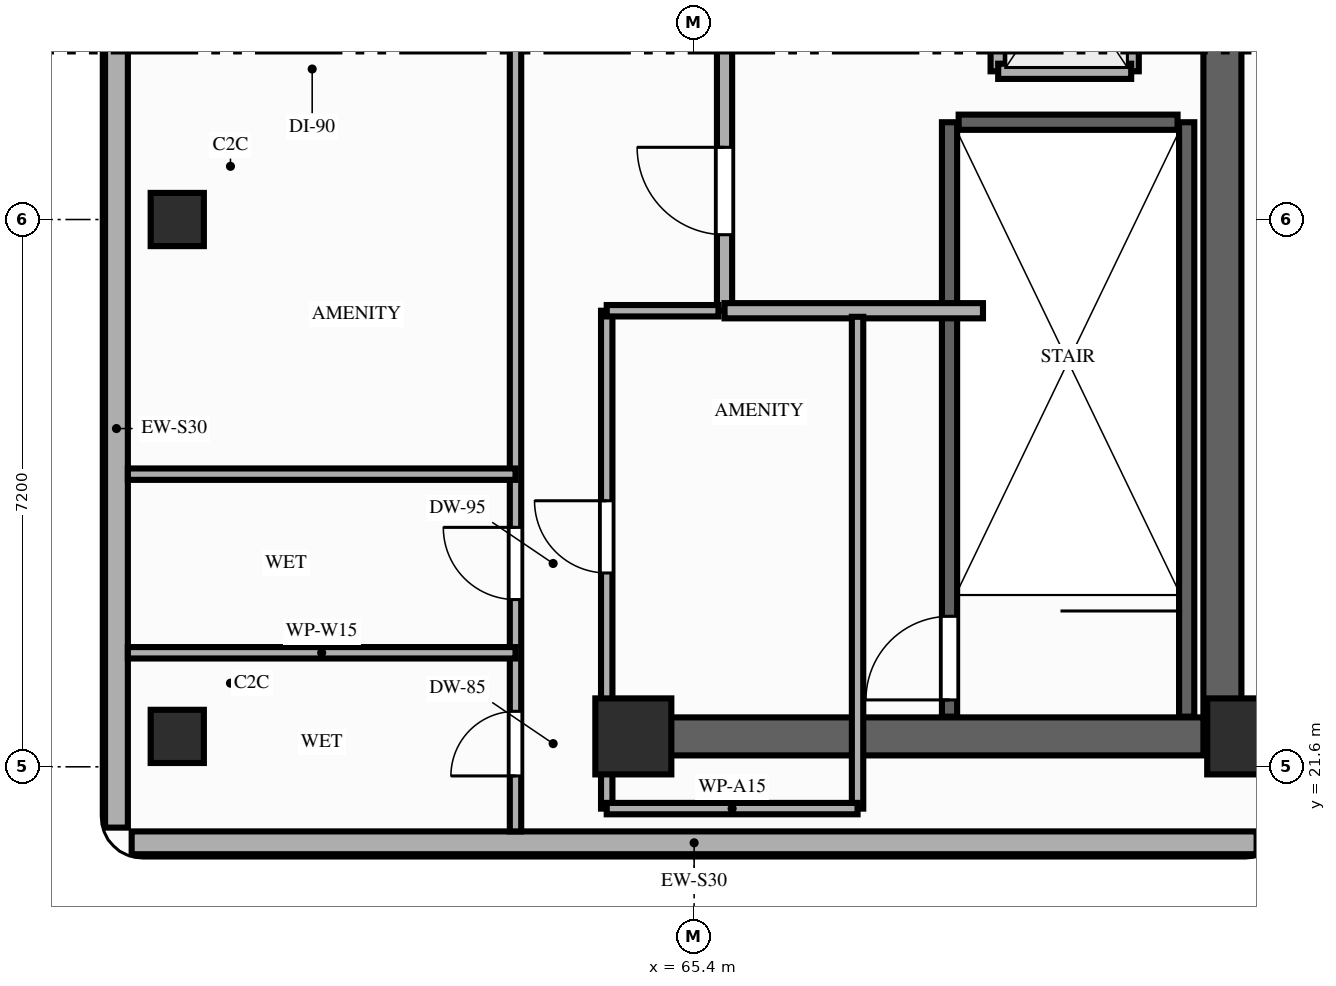
"""IFC4 building model, lengths in metres.
Left out: names, types, materials, properties, quantities, classifications, styles, units other than length and angle.
Written with IfcOpenShell. Run it as: python <this file> out.ifc"""

import sys

from ifc_helpers import new_model, si_unit, direction, frame, frame_2d, origin, origin_2d, place, context, subcontext, project, spatial, rectangle, extrude, element, fill, save


model = new_model("IFC4")
c1 = context("Model", 3, precision=1e-05, world=origin(), true_north=direction((0.0, 1.0)))
c2 = subcontext(c1, "Body", "Model", "MODEL_VIEW")
j1 = project(units=[si_unit("LENGTHUNIT", "METRE"), si_unit("PLANEANGLEUNIT", "RADIAN")], contexts=[c1])
p1 = place(None, origin())
s1 = spatial("IfcSite", under=j1, at=p1, CompositionType="ELEMENT")
p2 = place(p1, origin())
s2 = spatial("IfcBuilding", under=s1, at=p2, CompositionType="ELEMENT")
p3 = place(p2, frame((0.0, 0.0, 102.6)))
s3 = spatial("IfcBuildingStorey", under=s2, at=p3, CompositionType="ELEMENT", Elevation=102.6)
for number, where, z_axis, x_axis in (
    (1, (64.6, 22.0, 0.0), (0.0, 0.0, 1.0), (1.0, 0.0, 0.0)),
    (2, (72.65, 22.0, 0.0), (0.0, 0.0, 1.0), (1.0, 0.0, 0.0)),
):
    element("IfcColumn", number, at=place(p3, frame(where, z_axis=z_axis, x_axis=x_axis)), inside=s3, PredefinedType="COLUMN", context=c2, shape_type="SweptSolid", body=[
        extrude(rectangle(XDim=1.0, YDim=1.0, at=origin_2d()), origin(), (0.0, 0.0, 1.0), 4.8),
    ])
for number, where, z_axis, x_axis in (
    (3, (58.6, 22.0, 0.0), (0.0, 0.0, 1.0), (1.0, 0.0, 0.0)),
    (4, (58.6, 28.8, 0.0), (0.0, 0.0, 1.0), (1.0, 0.0, 0.0)),
):
    element("IfcColumn", number, at=place(p3, frame(where, z_axis=z_axis, x_axis=x_axis)), inside=s3, PredefinedType="COLUMN", context=c2, shape_type="SweptSolid", body=[
        extrude(rectangle(XDim=0.7, YDim=0.7, at=origin_2d()), origin(), (0.0, 0.0, 1.0), 4.8),
    ])
p4 = place(p3, frame((57.8, 31.3, 0.0), z_axis=(0.0, 0.0, 1.0), x_axis=(0.0, -1.0, 0.0)))
e5 = element("IfcWall", 5, at=p4, inside=s3, PredefinedType="STANDARD", context=c2, shape_type="SweptSolid", body=[
    extrude(rectangle(XDim=10.5, YDim=0.3, at=frame_2d((5.25, 0.0))), origin(), (0.0, 0.0, 1.0), 4.58),
])
p5 = place(p3, frame((58.0, 20.6, 0.0), z_axis=(0.0, 0.0, 1.0), x_axis=(1.0, 0.0, 0.0)))
e6 = element("IfcWall", 6, at=p5, inside=s3, PredefinedType="STANDARD", context=c2, shape_type="SweptSolid", body=[
    extrude(rectangle(XDim=14.8, YDim=0.3, at=frame_2d((7.4, 0.0))), origin(), (0.0, 0.0, 1.0), 4.58),
])
p6 = place(p3, frame((72.35, 22.0, 0.0), z_axis=(0.0, 0.0, 1.0), x_axis=(0.0, 1.0, 0.0)))
e7 = element("IfcWall", 7, at=p6, inside=s3, PredefinedType="SHEAR", context=c2, shape_type="SweptSolid", body=[
    extrude(rectangle(XDim=20.25, YDim=0.5, at=frame_2d((10.125, 0.0))), origin(), (0.0, 0.0, 1.0), 4.56),
])
p7 = place(p3, frame((64.6, 22.0, 0.0), z_axis=(0.0, 0.0, 1.0), x_axis=(1.0, 0.0, 0.0)))
e8 = element("IfcWall", 8, at=p7, inside=s3, PredefinedType="SHEAR", context=c2, shape_type="SweptSolid", body=[
    extrude(rectangle(XDim=7.5, YDim=0.5, at=frame_2d((3.75, 0.0))), origin(), (0.0, 0.0, 1.0), 4.56),
])
p8 = place(p3, frame((68.76, 22.26, 0.0), z_axis=(0.0, 0.0, 1.0), x_axis=(0.0, 1.0, 0.0)))
e9 = element("IfcWall", 9, at=p8, inside=s3, PredefinedType="SHEAR", context=c2, shape_type="SweptSolid", body=[
    extrude(rectangle(XDim=7.82, YDim=0.2, at=frame_2d((3.91, 0.0))), origin(), (0.0, 0.0, 1.0), 4.56),
])
p9 = place(p8, frame((0.22, 0.0, 0.0)))
e10 = element("IfcOpeningElement", 10, at=p9, cuts=e9, PredefinedType="OPENING", context=c2, shape_type="SweptSolid", body=[
    extrude(rectangle(XDim=1.1, YDim=2.15, at=frame_2d((0.55, 1.075))), frame((0.0, 0.11, 0.0), z_axis=(0.0, -1.0, 0.0), x_axis=(1.0, 0.0, 0.0)), (0.0, 0.0, 1.0), 0.22),
])
p10 = place(p3, frame((71.88, 22.26, 0.0), z_axis=(0.0, 0.0, 1.0), x_axis=(0.0, 1.0, 0.0)))
e11 = element("IfcWall", 11, at=p10, inside=s3, PredefinedType="SHEAR", context=c2, shape_type="SweptSolid", body=[
    extrude(rectangle(XDim=7.82, YDim=0.2, at=frame_2d((3.91, 0.0))), origin(), (0.0, 0.0, 1.0), 4.56),
])
p11 = place(p3, frame((68.88, 30.08, 0.0), z_axis=(0.0, 0.0, 1.0), x_axis=(1.0, 0.0, 0.0)))
e12 = element("IfcWall", 12, at=p11, inside=s3, PredefinedType="SHEAR", context=c2, shape_type="SweptSolid", body=[
    extrude(rectangle(XDim=2.88, YDim=0.2, at=frame_2d((1.44, 0.0))), origin(), (0.0, 0.0, 1.0), 4.56),
])
p12 = place(p3, frame((69.4, 30.75, 0.0), z_axis=(0.0, 0.0, 1.0), x_axis=(0.0, 1.0, 0.0)))
e13 = element("IfcWall", 13, at=p12, inside=s3, PredefinedType="MOVABLE", context=c2, shape_type="SweptSolid", body=[
    extrude(rectangle(XDim=2.45, YDim=0.2, at=frame_2d((1.225, 0.0))), origin(), (0.0, 0.0, 1.0), 4.56),
])
p13 = place(p12, frame((0.65, 0.0, 0.0)))
e14 = element("IfcOpeningElement", 14, at=p13, cuts=e13, PredefinedType="OPENING", context=c2, shape_type="SweptSolid", body=[
    extrude(rectangle(XDim=1.05, YDim=2.15, at=frame_2d((0.525, 1.075))), frame((0.0, 0.11, 0.0), z_axis=(0.0, -1.0, 0.0), x_axis=(1.0, 0.0, 0.0)), (0.0, 0.0, 1.0), 0.22),
])
p14 = place(p3, frame((71.15, 30.75, 0.0), z_axis=(0.0, 0.0, 1.0), x_axis=(0.0, 1.0, 0.0)))
e15 = element("IfcWall", 15, at=p14, inside=s3, PredefinedType="MOVABLE", context=c2, shape_type="SweptSolid", body=[
    extrude(rectangle(XDim=2.45, YDim=0.2, at=frame_2d((1.225, 0.0))), origin(), (0.0, 0.0, 1.0), 4.56),
])
p15 = place(p3, frame((69.4, 30.75, 0.0), z_axis=(0.0, 0.0, 1.0), x_axis=(1.0, 0.0, 0.0)))
e16 = element("IfcWall", 16, at=p15, inside=s3, PredefinedType="MOVABLE", context=c2, shape_type="SweptSolid", body=[
    extrude(rectangle(XDim=1.75, YDim=0.2, at=frame_2d((0.875, 0.0))), origin(), (0.0, 0.0, 1.0), 4.56),
])
p16 = place(p3, frame((65.8, 27.6, 0.0), z_axis=(0.0, 0.0, 1.0), x_axis=(0.0, 1.0, 0.0)))
e17 = element("IfcWall", 17, at=p16, inside=s3, PredefinedType="PARTITIONING", context=c2, shape_type="SweptSolid", body=[
    extrude(rectangle(XDim=5.5, YDim=0.2, at=frame_2d((2.75, 0.0))), origin(), (0.0, 0.0, 1.0), 4.56),
])
p17 = place(p16, frame((1.0, 0.0, 0.0)))
e18 = element("IfcOpeningElement", 18, at=p17, cuts=e17, PredefinedType="OPENING", context=c2, shape_type="SweptSolid", body=[
    extrude(rectangle(XDim=1.15, YDim=2.15, at=frame_2d((0.575, 1.075))), frame((0.0, 0.11, 0.0), z_axis=(0.0, -1.0, 0.0), x_axis=(1.0, 0.0, 0.0)), (0.0, 0.0, 1.0), 0.22),
])
p18 = place(p3, frame((65.8, 27.6, 0.0), z_axis=(0.0, 0.0, 1.0), x_axis=(1.0, 0.0, 0.0)))
e19 = element("IfcWall", 19, at=p18, inside=s3, PredefinedType="PARTITIONING", context=c2, shape_type="SweptSolid", body=[
    extrude(rectangle(XDim=3.4, YDim=0.2, at=frame_2d((1.7, 0.0))), origin(), (0.0, 0.0, 1.0), 4.56),
])
p19 = place(p3, frame((64.25, 21.05, 0.0), z_axis=(0.0, 0.0, 1.0), x_axis=(0.0, 1.0, 0.0)))
e20 = element("IfcWall", 20, at=p19, inside=s3, PredefinedType="PARTITIONING", context=c2, shape_type="SweptSolid", body=[
    extrude(rectangle(XDim=6.55, YDim=0.15, at=frame_2d((3.275, 0.0))), origin(), (0.0, 0.0, 1.0), 4.17),
])
p20 = place(p19, frame((3.1, 0.0, 0.0)))
e21 = element("IfcOpeningElement", 21, at=p20, cuts=e20, PredefinedType="OPENING", context=c2, shape_type="SweptSolid", body=[
    extrude(rectangle(XDim=0.95, YDim=2.15, at=frame_2d((0.475, 1.075))), frame((0.0, 0.085, 0.0), z_axis=(0.0, -1.0, 0.0), x_axis=(1.0, 0.0, 0.0)), (0.0, 0.0, 1.0), 0.17),
])
p21 = place(p3, frame((67.55, 21.05, 0.0), z_axis=(0.0, 0.0, 1.0), x_axis=(0.0, 1.0, 0.0)))
e22 = element("IfcWall", 22, at=p21, inside=s3, PredefinedType="PARTITIONING", context=c2, shape_type="SweptSolid", body=[
    extrude(rectangle(XDim=6.47, YDim=0.15, at=frame_2d((3.235, 0.0))), origin(), (0.0, 0.0, 1.0), 4.17),
])
p22 = place(p3, frame((64.25, 21.05, 0.0), z_axis=(0.0, 0.0, 1.0), x_axis=(1.0, 0.0, 0.0)))
e23 = element("IfcWall", 23, at=p22, inside=s3, PredefinedType="PARTITIONING", context=c2, shape_type="SweptSolid", body=[
    extrude(rectangle(XDim=3.3, YDim=0.15, at=frame_2d((1.65, 0.0))), origin(), (0.0, 0.0, 1.0), 4.56),
])
p23 = place(p3, frame((64.25, 27.6, 0.0), z_axis=(0.0, 0.0, 1.0), x_axis=(1.0, 0.0, 0.0)))
e24 = element("IfcWall", 24, at=p23, inside=s3, PredefinedType="PARTITIONING", context=c2, shape_type="SweptSolid", body=[
    extrude(rectangle(XDim=1.47, YDim=0.15, at=frame_2d((0.735, 0.0))), origin(), (0.0, 0.0, 1.0), 4.17),
])
p24 = place(p3, frame((63.05, 20.75, 0.0), z_axis=(0.0, 0.0, 1.0), x_axis=(0.0, 1.0, 0.0)))
e25 = element("IfcWall", 25, at=p24, inside=s3, PredefinedType="PARTITIONING", context=c2, shape_type="SweptSolid", body=[
    extrude(rectangle(XDim=10.55, YDim=0.15, at=frame_2d((5.275, 0.0))), origin(), (0.0, 0.0, 1.0), 4.17),
])
p25 = place(p24, frame((0.73, 0.0, 0.0)))
e26 = element("IfcOpeningElement", 26, at=p25, cuts=e25, PredefinedType="OPENING", context=c2, shape_type="SweptSolid", body=[
    extrude(rectangle(XDim=0.85, YDim=2.1, at=frame_2d((0.425, 1.05))), frame((0.0, 0.085, 0.0), z_axis=(0.0, -1.0, 0.0), x_axis=(1.0, 0.0, 0.0)), (0.0, 0.0, 1.0), 0.17),
])
p26 = place(p24, frame((3.05, 0.0, 0.0)))
e27 = element("IfcOpeningElement", 27, at=p26, cuts=e25, PredefinedType="OPENING", context=c2, shape_type="SweptSolid", body=[
    extrude(rectangle(XDim=0.95, YDim=2.1, at=frame_2d((0.475, 1.05))), frame((0.0, 0.085, 0.0), z_axis=(0.0, -1.0, 0.0), x_axis=(1.0, 0.0, 0.0)), (0.0, 0.0, 1.0), 0.17),
])
for number, where, z_axis, x_axis in (
    (28, (57.95, 23.1, 0.0), (0.0, 0.0, 1.0), (1.0, 0.0, 0.0)),
    (29, (57.95, 25.45, 0.0), (0.0, 0.0, 1.0), (1.0, 0.0, 0.0)),
):
    element("IfcWall", number, at=place(p3, frame(where, z_axis=z_axis, x_axis=x_axis)), inside=s3, PredefinedType="PARTITIONING", context=c2, shape_type="SweptSolid", body=[
        extrude(rectangle(XDim=5.1, YDim=0.15, at=frame_2d((2.55, 0.0))), origin(), (0.0, 0.0, 1.0), 4.17),
    ])
p27 = place(p9, origin())
e30 = element("IfcDoor", 30, at=p27, inside=s3, OperationType="SINGLE_SWING_LEFT", PredefinedType="DOOR", context=c2, shape_type="SweptSolid", body=[
    extrude(rectangle(XDim=1.1, YDim=2.15, at=frame_2d((0.55, 1.075))), frame((0.0, 0.025, 0.0), z_axis=(0.0, -1.0, 0.0), x_axis=(1.0, 0.0, 0.0)), (0.0, 0.0, 1.0), 0.05),
])
fill(e10, e30)
p28 = place(p17, origin())
e31 = element("IfcDoor", 31, at=p28, inside=s3, OperationType="SINGLE_SWING_RIGHT", PredefinedType="DOOR", context=c2, shape_type="SweptSolid", body=[
    extrude(rectangle(XDim=1.15, YDim=2.15, at=frame_2d((0.575, 1.075))), frame((0.0, 0.025, 0.0), z_axis=(0.0, -1.0, 0.0), x_axis=(1.0, 0.0, 0.0)), (0.0, 0.0, 1.0), 0.05),
])
fill(e18, e31)
p29 = place(p20, origin())
e32 = element("IfcDoor", 32, at=p29, inside=s3, OperationType="SINGLE_SWING_RIGHT", PredefinedType="DOOR", context=c2, shape_type="SweptSolid", body=[
    extrude(rectangle(XDim=0.95, YDim=2.15, at=frame_2d((0.475, 1.075))), frame((0.0, 0.025, 0.0), z_axis=(0.0, -1.0, 0.0), x_axis=(1.0, 0.0, 0.0)), (0.0, 0.0, 1.0), 0.05),
])
fill(e21, e32)
p30 = place(p25, origin())
e33 = element("IfcDoor", 33, at=p30, inside=s3, OperationType="SINGLE_SWING_LEFT", PredefinedType="DOOR", context=c2, shape_type="SweptSolid", body=[
    extrude(rectangle(XDim=0.85, YDim=2.1, at=frame_2d((0.425, 1.05))), frame((0.0, 0.025, 0.0), z_axis=(0.0, -1.0, 0.0), x_axis=(1.0, 0.0, 0.0)), (0.0, 0.0, 1.0), 0.05),
])
fill(e26, e33)
p31 = place(p26, origin())
e34 = element("IfcDoor", 34, at=p31, inside=s3, OperationType="SINGLE_SWING_RIGHT", PredefinedType="DOOR", context=c2, shape_type="SweptSolid", body=[
    extrude(rectangle(XDim=0.95, YDim=2.1, at=frame_2d((0.475, 1.05))), frame((0.0, 0.025, 0.0), z_axis=(0.0, -1.0, 0.0), x_axis=(1.0, 0.0, 0.0)), (0.0, 0.0, 1.0), 0.05),
])
fill(e27, e34)
save(model, sys.argv[1])
